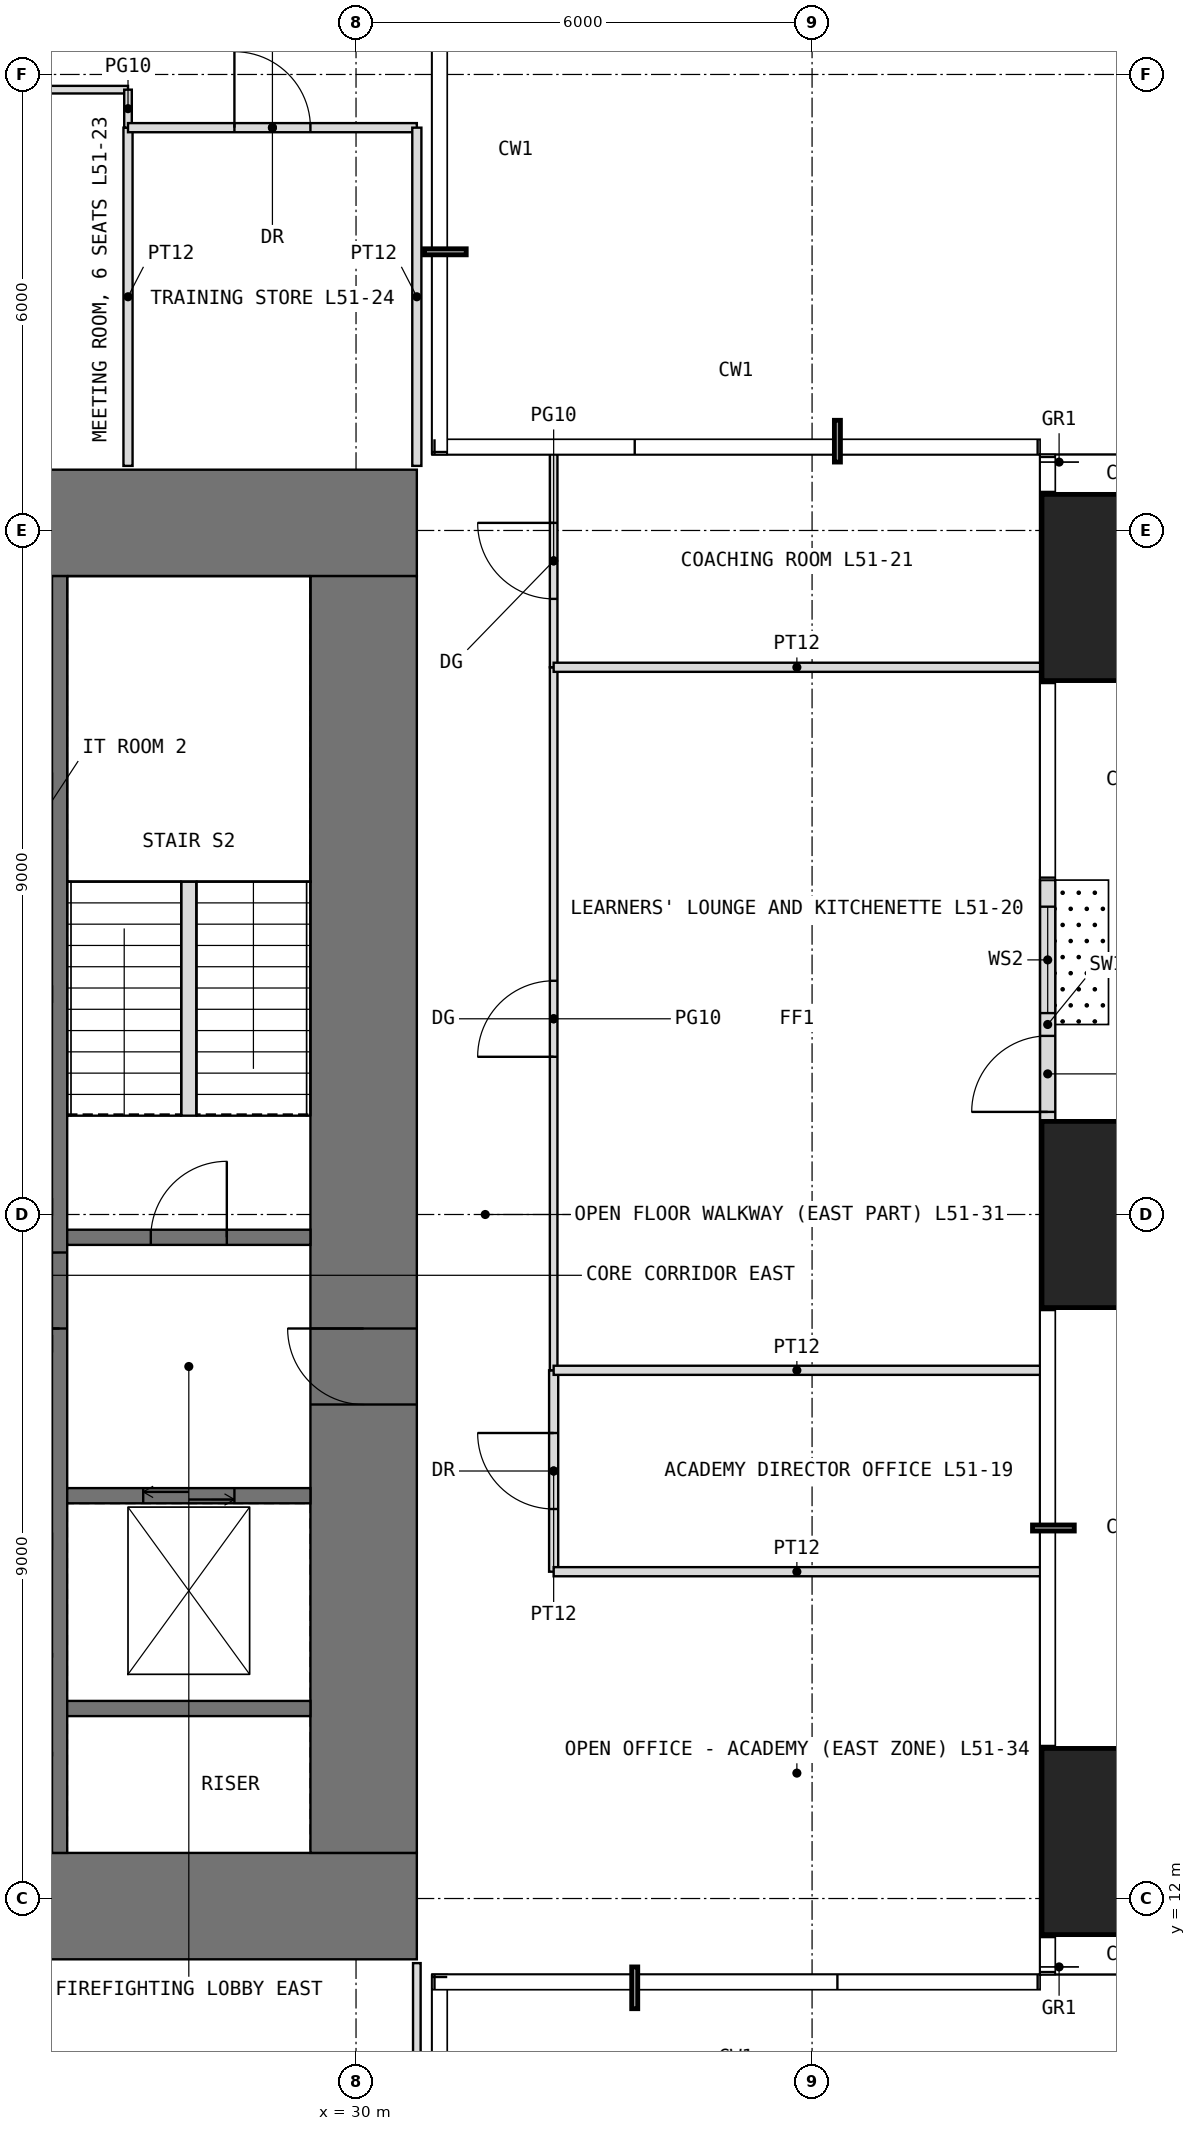
"""IFC4 building model, lengths in metres.
Left out: names, types, materials, properties, quantities, classifications, styles, units other than length and angle.
Written with IfcOpenShell. Run it as: python <this file> out.ifc"""

import sys

from ifc_helpers import new_model, si_unit, direction, frame, frame_2d, origin, origin_2d, place, context, subcontext, project, spatial, rectangle, extrude, element, fill, save


model = new_model("IFC4")
c1 = context("Model", 3, precision=1e-05, world=origin(), true_north=direction((0.0, 1.0)))
c2 = subcontext(c1, "Body", "Model", "MODEL_VIEW")
j1 = project(units=[si_unit("LENGTHUNIT", "METRE"), si_unit("PLANEANGLEUNIT", "RADIAN")], contexts=[c1])
p1 = place(None, origin())
s1 = spatial("IfcSite", under=j1, at=p1, CompositionType="ELEMENT")
p2 = place(p1, origin())
s2 = spatial("IfcBuilding", under=s1, at=p2, CompositionType="ELEMENT")
p3 = place(p2, frame((0.0, 0.0, 214.5)))
s3 = spatial("IfcBuildingStorey", under=s2, at=p3, CompositionType="ELEMENT", Elevation=214.5)
for number, where, z_axis, x_axis in (
    (1, (40.25, 12.75, 0.0), (0.0, 0.0, 1.0), (1.0, 0.0, 0.0)),
    (2, (40.25, 21.0, 0.0), (0.0, 0.0, 1.0), (1.0, 0.0, 0.0)),
    (3, (40.25, 29.25, 0.0), (0.0, 0.0, 1.0), (1.0, 0.0, 0.0)),
):
    element("IfcColumn", number, at=place(p3, frame(where, z_axis=z_axis, x_axis=x_axis)), inside=s3, PredefinedType="COLUMN", context=c2, shape_type="SweptSolid", body=[
        extrude(rectangle(XDim=2.45, YDim=2.45, at=origin_2d()), origin(), (0.0, 0.0, 1.0), 4.0),
    ])
p4 = place(p3, frame((39.1, 21.6, 0.0), z_axis=(0.0, 0.0, 1.0), x_axis=(0.0, 1.0, 0.0)))
e4 = element("IfcWall", 4, at=p4, inside=s3, PredefinedType="USERDEFINED", context=c2, shape_type="SweptSolid", body=[
    extrude(rectangle(XDim=3.8, YDim=0.2, at=frame_2d((1.9, 0.0))), origin(), (0.0, 0.0, 1.0), 3.75),
])
p5 = place(p4, frame((0.75, 0.0, 0.0)))
e5 = element("IfcOpeningElement", 5, at=p5, cuts=e4, PredefinedType="OPENING", context=c2, shape_type="SweptSolid", body=[
    extrude(rectangle(XDim=1.0, YDim=2.4, at=frame_2d((0.5, 1.2))), frame((0.0, 0.11, 0.0), z_axis=(0.0, -1.0, 0.0), x_axis=(1.0, 0.0, 0.0)), (0.0, 0.0, 1.0), 0.22),
])
p6 = place(p4, frame((2.05, 0.0, 0.3)))
e6 = element("IfcOpeningElement", 6, at=p6, cuts=e4, PredefinedType="OPENING", context=c2, shape_type="SweptSolid", body=[
    extrude(rectangle(XDim=1.4, YDim=2.7, at=frame_2d((0.7, 1.35))), frame((0.0, 0.11, 0.0), z_axis=(0.0, -1.0, 0.0), x_axis=(1.0, 0.0, 0.0)), (0.0, 0.0, 1.0), 0.22),
])
p7 = place(p3, frame((11.2, 11.9, -0.05), z_axis=(0.0, 0.0, 1.0), x_axis=(1.0, 0.0, 0.0)))
e7 = element("IfcWall", 7, at=p7, inside=s3, PredefinedType="SHEAR", context=c2, shape_type="SweptSolid", body=[
    extrude(rectangle(XDim=19.6, YDim=1.4, at=frame_2d((9.8, 0.0))), origin(), (0.0, 0.0, 1.0), 4.0),
])
p8 = place(p7, frame((8.8, 0.0, 0.05)))
e8 = element("IfcOpeningElement", 8, at=p8, cuts=e7, PredefinedType="OPENING", context=c2, shape_type="SweptSolid", body=[
    extrude(rectangle(XDim=2.0, YDim=2.2, at=frame_2d((1.0, 1.1))), frame((0.0, 0.71, 0.0), z_axis=(0.0, -1.0, 0.0), x_axis=(1.0, 0.0, 0.0)), (0.0, 0.0, 1.0), 1.42),
])
p9 = place(p3, frame((11.2, 30.1, -0.05), z_axis=(0.0, 0.0, 1.0), x_axis=(1.0, 0.0, 0.0)))
e9 = element("IfcWall", 9, at=p9, inside=s3, PredefinedType="SHEAR", context=c2, shape_type="SweptSolid", body=[
    extrude(rectangle(XDim=19.6, YDim=1.4, at=frame_2d((9.8, 0.0))), origin(), (0.0, 0.0, 1.0), 4.0),
])
p10 = place(p9, frame((8.8, 0.0, 0.05)))
e10 = element("IfcOpeningElement", 10, at=p10, cuts=e9, PredefinedType="OPENING", context=c2, shape_type="SweptSolid", body=[
    extrude(rectangle(XDim=2.0, YDim=2.2, at=frame_2d((1.0, 1.1))), frame((0.0, 0.71, 0.0), z_axis=(0.0, -1.0, 0.0), x_axis=(1.0, 0.0, 0.0)), (0.0, 0.0, 1.0), 1.42),
])
p11 = place(p3, frame((30.1, 12.6, -0.05), z_axis=(0.0, 0.0, 1.0), x_axis=(0.0, 1.0, 0.0)))
e11 = element("IfcWall", 11, at=p11, inside=s3, PredefinedType="SHEAR", context=c2, shape_type="SweptSolid", body=[
    extrude(rectangle(XDim=16.8, YDim=1.4, at=frame_2d((8.4, 0.0))), origin(), (0.0, 0.0, 1.0), 4.0),
])
p12 = place(p11, frame((5.9, 0.0, 0.05)))
e12 = element("IfcOpeningElement", 12, at=p12, cuts=e11, PredefinedType="OPENING", context=c2, shape_type="SweptSolid", body=[
    extrude(rectangle(XDim=1.0, YDim=2.2, at=frame_2d((0.5, 1.1))), frame((0.0, 0.71, 0.0), z_axis=(0.0, -1.0, 0.0), x_axis=(1.0, 0.0, 0.0)), (0.0, 0.0, 1.0), 1.42),
])
p13 = place(p3, frame((26.1, 12.6, -0.05), z_axis=(0.0, 0.0, 1.0), x_axis=(0.0, 1.0, 0.0)))
e13 = element("IfcWall", 13, at=p13, inside=s3, PredefinedType="SHEAR", context=c2, shape_type="SweptSolid", body=[
    extrude(rectangle(XDim=16.8, YDim=0.2, at=frame_2d((8.4, 0.0))), origin(), (0.0, 0.0, 1.0), 4.0),
])
p14 = place(p13, frame((6.9, 0.0, 0.05)))
e14 = element("IfcOpeningElement", 14, at=p14, cuts=e13, PredefinedType="OPENING", context=c2, shape_type="SweptSolid", body=[
    extrude(rectangle(XDim=1.0, YDim=2.2, at=frame_2d((0.5, 1.1))), frame((0.0, 0.11, 0.0), z_axis=(0.0, -1.0, 0.0), x_axis=(1.0, 0.0, 0.0)), (0.0, 0.0, 1.0), 0.22),
])
for number, where, z_axis, x_axis in (
    (15, (22.8, 16.7, -0.05), (0.0, 0.0, 1.0), (1.0, 0.0, 0.0)),
    (16, (22.8, 19.3, -0.05), (0.0, 0.0, 1.0), (1.0, 0.0, 0.0)),
    (17, (22.8, 21.1, -0.05), (0.0, 0.0, 1.0), (1.0, 0.0, 0.0)),
    (18, (22.8, 23.9, -0.05), (0.0, 0.0, 1.0), (1.0, 0.0, 0.0)),
    (19, (22.8, 26.7, -0.05), (0.0, 0.0, 1.0), (1.0, 0.0, 0.0)),
    (20, (26.2, 14.5, -0.05), (0.0, 0.0, 1.0), (1.0, 0.0, 0.0)),
):
    element("IfcWall", number, at=place(p3, frame(where, z_axis=z_axis, x_axis=x_axis)), inside=s3, PredefinedType="SHEAR", context=c2, shape_type="SweptSolid", body=[
        extrude(rectangle(XDim=3.2, YDim=0.2, at=frame_2d((1.6, 0.0))), origin(), (0.0, 0.0, 1.0), 4.0),
    ])
p15 = place(p3, frame((26.2, 17.3, -0.05), z_axis=(0.0, 0.0, 1.0), x_axis=(1.0, 0.0, 0.0)))
e21 = element("IfcWall", 21, at=p15, inside=s3, PredefinedType="SHEAR", context=c2, shape_type="SweptSolid", body=[
    extrude(rectangle(XDim=3.2, YDim=0.2, at=frame_2d((1.6, 0.0))), origin(), (0.0, 0.0, 1.0), 4.0),
])
p16 = place(p15, frame((1.0, 0.0, 0.05)))
e22 = element("IfcOpeningElement", 22, at=p16, cuts=e21, PredefinedType="OPENING", context=c2, shape_type="SweptSolid", body=[
    extrude(rectangle(XDim=1.2, YDim=2.2, at=frame_2d((0.6, 1.1))), frame((0.0, 0.11, 0.0), z_axis=(0.0, -1.0, 0.0), x_axis=(1.0, 0.0, 0.0)), (0.0, 0.0, 1.0), 0.22),
])
p17 = place(p3, frame((26.2, 20.7, -0.05), z_axis=(0.0, 0.0, 1.0), x_axis=(1.0, 0.0, 0.0)))
e23 = element("IfcWall", 23, at=p17, inside=s3, PredefinedType="SHEAR", context=c2, shape_type="SweptSolid", body=[
    extrude(rectangle(XDim=3.2, YDim=0.2, at=frame_2d((1.6, 0.0))), origin(), (0.0, 0.0, 1.0), 4.0),
])
p18 = place(p17, frame((1.1, 0.0, 0.05)))
e24 = element("IfcOpeningElement", 24, at=p18, cuts=e23, PredefinedType="OPENING", context=c2, shape_type="SweptSolid", body=[
    extrude(rectangle(XDim=1.0, YDim=2.2, at=frame_2d((0.5, 1.1))), frame((0.0, 0.11, 0.0), z_axis=(0.0, -1.0, 0.0), x_axis=(1.0, 0.0, 0.0)), (0.0, 0.0, 1.0), 0.22),
])
p19 = place(p3, frame((23.4, 35.8, 0.0), z_axis=(0.0, 0.0, 1.0), x_axis=(1.0, 0.0, 0.0)))
e25 = element("IfcWall", 25, at=p19, inside=s3, PredefinedType="PARTITIONING", context=c2, shape_type="SweptSolid", body=[
    extrude(rectangle(XDim=3.6, YDim=0.1, at=frame_2d((1.8, 0.0))), origin(), (0.0, 0.0, 1.0), 3.75),
])
p20 = place(p19, frame((1.3, 0.0, 0.0)))
e26 = element("IfcOpeningElement", 26, at=p20, cuts=e25, PredefinedType="OPENING", context=c2, shape_type="SweptSolid", body=[
    extrude(rectangle(XDim=1.0, YDim=2.4, at=frame_2d((0.5, 1.2))), frame((0.0, 0.06, 0.0), z_axis=(0.0, -1.0, 0.0), x_axis=(1.0, 0.0, 0.0)), (0.0, 0.0, 1.0), 0.12),
])
p21 = place(p3, frame((27.0, 30.85, 0.0), z_axis=(0.0, 0.0, 1.0), x_axis=(0.0, 1.0, 0.0)))
e27 = element("IfcWall", 27, at=p21, inside=s3, PredefinedType="PARTITIONING", context=c2, shape_type="SweptSolid", body=[
    extrude(rectangle(XDim=4.45, YDim=0.12, at=frame_2d((2.225, 0.0))), origin(), (0.0, 0.0, 1.0), 3.75),
])
p22 = place(p3, frame((27.0, 35.3, 0.0), z_axis=(0.0, 0.0, 1.0), x_axis=(0.0, 1.0, 0.0)))
e28 = element("IfcWall", 28, at=p22, inside=s3, PredefinedType="PARTITIONING", context=c2, shape_type="SweptSolid", body=[
    extrude(rectangle(XDim=0.5, YDim=0.1, at=frame_2d((0.25, 0.0))), origin(), (0.0, 0.0, 1.0), 3.75),
])
p23 = place(p3, frame((27.0, 35.3, 0.0), z_axis=(0.0, 0.0, 1.0), x_axis=(1.0, 0.0, 0.0)))
e29 = element("IfcWall", 29, at=p23, inside=s3, PredefinedType="PARTITIONING", context=c2, shape_type="SweptSolid", body=[
    extrude(rectangle(XDim=3.8, YDim=0.12, at=frame_2d((1.9, 0.0))), origin(), (0.0, 0.0, 1.0), 3.75),
])
p24 = place(p23, frame((1.4, 0.0, 0.0)))
e30 = element("IfcOpeningElement", 30, at=p24, cuts=e29, PredefinedType="OPENING", context=c2, shape_type="SweptSolid", body=[
    extrude(rectangle(XDim=1.0, YDim=2.2, at=frame_2d((0.5, 1.1))), frame((0.0, 0.07, 0.0), z_axis=(0.0, -1.0, 0.0), x_axis=(1.0, 0.0, 0.0)), (0.0, 0.0, 1.0), 0.14),
])
p25 = place(p3, frame((30.8, 5.6, 0.0), z_axis=(0.0, 0.0, 1.0), x_axis=(0.0, 1.0, 0.0)))
e31 = element("IfcWall", 31, at=p25, inside=s3, PredefinedType="PARTITIONING", context=c2, shape_type="SweptSolid", body=[
    extrude(rectangle(XDim=5.55, YDim=0.1, at=frame_2d((2.775, 0.0))), origin(), (0.0, 0.0, 1.0), 3.75),
])
p26 = place(p3, frame((30.8, 30.85, 0.0), z_axis=(0.0, 0.0, 1.0), x_axis=(0.0, 1.0, 0.0)))
e32 = element("IfcWall", 32, at=p26, inside=s3, PredefinedType="PARTITIONING", context=c2, shape_type="SweptSolid", body=[
    extrude(rectangle(XDim=4.45, YDim=0.12, at=frame_2d((2.225, 0.0))), origin(), (0.0, 0.0, 1.0), 3.75),
])
p27 = place(p3, frame((32.6, 16.3, 0.0), z_axis=(0.0, 0.0, 1.0), x_axis=(0.0, 1.0, 0.0)))
e33 = element("IfcWall", 33, at=p27, inside=s3, PredefinedType="PARTITIONING", context=c2, shape_type="SweptSolid", body=[
    extrude(rectangle(XDim=2.65, YDim=0.12, at=frame_2d((1.325, 0.0))), origin(), (0.0, 0.0, 1.0), 3.75),
])
p28 = place(p27, frame((0.825, 0.0, 0.0)))
e34 = element("IfcOpeningElement", 34, at=p28, cuts=e33, PredefinedType="OPENING", context=c2, shape_type="SweptSolid", body=[
    extrude(rectangle(XDim=1.0, YDim=2.2, at=frame_2d((0.5, 1.1))), frame((0.0, 0.07, 0.0), z_axis=(0.0, -1.0, 0.0), x_axis=(1.0, 0.0, 0.0)), (0.0, 0.0, 1.0), 0.14),
])
p29 = place(p3, frame((32.6, 16.3, 0.0), z_axis=(0.0, 0.0, 1.0), x_axis=(1.0, 0.0, 0.0)))
e35 = element("IfcWall", 35, at=p29, inside=s3, PredefinedType="PARTITIONING", context=c2, shape_type="SweptSolid", body=[
    extrude(rectangle(XDim=6.4, YDim=0.12, at=frame_2d((3.2, 0.0))), origin(), (0.0, 0.0, 1.0), 3.75),
])
p30 = place(p3, frame((32.6, 18.95, 0.0), z_axis=(0.0, 0.0, 1.0), x_axis=(0.0, 1.0, 0.0)))
e36 = element("IfcWall", 36, at=p30, inside=s3, PredefinedType="PARTITIONING", context=c2, shape_type="SweptSolid", body=[
    extrude(rectangle(XDim=9.25, YDim=0.1, at=frame_2d((4.625, 0.0))), origin(), (0.0, 0.0, 1.0), 3.75),
])
p31 = place(p30, frame((4.125, 0.0, 0.0)))
e37 = element("IfcOpeningElement", 37, at=p31, cuts=e36, PredefinedType="OPENING", context=c2, shape_type="SweptSolid", body=[
    extrude(rectangle(XDim=1.0, YDim=2.4, at=frame_2d((0.5, 1.2))), frame((0.0, 0.06, 0.0), z_axis=(0.0, -1.0, 0.0), x_axis=(1.0, 0.0, 0.0)), (0.0, 0.0, 1.0), 0.12),
])
p32 = place(p3, frame((32.6, 18.95, 0.0), z_axis=(0.0, 0.0, 1.0), x_axis=(1.0, 0.0, 0.0)))
e38 = element("IfcWall", 38, at=p32, inside=s3, PredefinedType="PARTITIONING", context=c2, shape_type="SweptSolid", body=[
    extrude(rectangle(XDim=6.4, YDim=0.12, at=frame_2d((3.2, 0.0))), origin(), (0.0, 0.0, 1.0), 3.75),
])
p33 = place(p3, frame((32.6, 28.2, 0.0), z_axis=(0.0, 0.0, 1.0), x_axis=(0.0, 1.0, 0.0)))
e39 = element("IfcWall", 39, at=p33, inside=s3, PredefinedType="PARTITIONING", context=c2, shape_type="SweptSolid", body=[
    extrude(rectangle(XDim=2.8, YDim=0.1, at=frame_2d((1.4, 0.0))), origin(), (0.0, 0.0, 1.0), 3.75),
])
p34 = place(p33, frame((0.9, 0.0, 0.0)))
e40 = element("IfcOpeningElement", 40, at=p34, cuts=e39, PredefinedType="OPENING", context=c2, shape_type="SweptSolid", body=[
    extrude(rectangle(XDim=1.0, YDim=2.4, at=frame_2d((0.5, 1.2))), frame((0.0, 0.06, 0.0), z_axis=(0.0, -1.0, 0.0), x_axis=(1.0, 0.0, 0.0)), (0.0, 0.0, 1.0), 0.12),
])
p35 = place(p3, frame((32.6, 28.2, 0.0), z_axis=(0.0, 0.0, 1.0), x_axis=(1.0, 0.0, 0.0)))
e41 = element("IfcWall", 41, at=p35, inside=s3, PredefinedType="PARTITIONING", context=c2, shape_type="SweptSolid", body=[
    extrude(rectangle(XDim=6.4, YDim=0.12, at=frame_2d((3.2, 0.0))), origin(), (0.0, 0.0, 1.0), 3.75),
])
p36 = place(p3, frame((27.8, 22.3, 0.0), z_axis=(0.0, 0.0, 1.0), x_axis=(0.0, 1.0, 0.0)))
e42 = element("IfcWall", 42, at=p36, inside=s3, PredefinedType="PARTITIONING", context=c2, shape_type="SweptSolid", body=[
    extrude(rectangle(XDim=3.08, YDim=0.2, at=frame_2d((1.54, 0.0))), origin(), (0.0, 0.0, 1.0), 4.0),
])
p37 = place(p5, origin())
e43 = element("IfcDoor", 43, at=p37, inside=s3, OperationType="SINGLE_SWING_LEFT", PredefinedType="DOOR", context=c2, shape_type="SweptSolid", body=[
    extrude(rectangle(XDim=1.0, YDim=2.4, at=frame_2d((0.5, 1.2))), frame((0.0, 0.025, 0.0), z_axis=(0.0, -1.0, 0.0), x_axis=(1.0, 0.0, 0.0)), (0.0, 0.0, 1.0), 0.05),
])
fill(e5, e43)
p38 = place(p6, origin())
e44 = element("IfcWindow", 44, at=p38, inside=s3, PartitioningType="SINGLE_PANEL", PredefinedType="WINDOW", context=c2, shape_type="SweptSolid", body=[
    extrude(rectangle(XDim=1.4, YDim=2.7, at=frame_2d((0.7, 1.35))), frame((0.0, 0.03, 0.0), z_axis=(0.0, -1.0, 0.0), x_axis=(1.0, 0.0, 0.0)), (0.0, 0.0, 1.0), 0.06),
])
fill(e6, e44)
p39 = place(p12, origin())
e45 = element("IfcDoor", 45, at=p39, inside=s3, OperationType="SINGLE_SWING_RIGHT", PredefinedType="DOOR", context=c2, shape_type="SweptSolid", body=[
    extrude(rectangle(XDim=1.0, YDim=2.2, at=frame_2d((0.5, 1.1))), frame((0.0, 0.025, 0.0), z_axis=(0.0, -1.0, 0.0), x_axis=(1.0, 0.0, 0.0)), (0.0, 0.0, 1.0), 0.05),
])
fill(e12, e45)
p40 = place(p18, origin())
e46 = element("IfcDoor", 46, at=p40, inside=s3, OperationType="SINGLE_SWING_RIGHT", PredefinedType="DOOR", context=c2, shape_type="SweptSolid", body=[
    extrude(rectangle(XDim=1.0, YDim=2.2, at=frame_2d((0.5, 1.1))), frame((0.0, 0.025, 0.0), z_axis=(0.0, -1.0, 0.0), x_axis=(1.0, 0.0, 0.0)), (0.0, 0.0, 1.0), 0.05),
])
fill(e24, e46)
p41 = place(p14, origin())
e47 = element("IfcDoor", 47, at=p41, inside=s3, OperationType="SINGLE_SWING_LEFT", PredefinedType="DOOR", context=c2, shape_type="SweptSolid", body=[
    extrude(rectangle(XDim=1.0, YDim=2.2, at=frame_2d((0.5, 1.1))), frame((0.0, 0.025, 0.0), z_axis=(0.0, -1.0, 0.0), x_axis=(1.0, 0.0, 0.0)), (0.0, 0.0, 1.0), 0.05),
])
fill(e14, e47)
p42 = place(p28, origin())
e48 = element("IfcDoor", 48, at=p42, inside=s3, OperationType="SINGLE_SWING_RIGHT", PredefinedType="DOOR", context=c2, shape_type="SweptSolid", body=[
    extrude(rectangle(XDim=1.0, YDim=2.2, at=frame_2d((0.5, 1.1))), frame((0.0, 0.025, 0.0), z_axis=(0.0, -1.0, 0.0), x_axis=(1.0, 0.0, 0.0)), (0.0, 0.0, 1.0), 0.05),
])
fill(e34, e48)
p43 = place(p31, origin())
e49 = element("IfcDoor", 49, at=p43, inside=s3, OperationType="SINGLE_SWING_LEFT", PredefinedType="DOOR", context=c2, shape_type="SweptSolid", body=[
    extrude(rectangle(XDim=1.0, YDim=2.4, at=frame_2d((0.5, 1.2))), frame((0.0, 0.025, 0.0), z_axis=(0.0, -1.0, 0.0), x_axis=(1.0, 0.0, 0.0)), (0.0, 0.0, 1.0), 0.05),
])
fill(e37, e49)
p44 = place(p34, origin())
e50 = element("IfcDoor", 50, at=p44, inside=s3, OperationType="SINGLE_SWING_RIGHT", PredefinedType="DOOR", context=c2, shape_type="SweptSolid", body=[
    extrude(rectangle(XDim=1.0, YDim=2.4, at=frame_2d((0.5, 1.2))), frame((0.0, 0.025, 0.0), z_axis=(0.0, -1.0, 0.0), x_axis=(1.0, 0.0, 0.0)), (0.0, 0.0, 1.0), 0.05),
])
fill(e40, e50)
p45 = place(p24, origin())
e51 = element("IfcDoor", 51, at=p45, inside=s3, OperationType="SINGLE_SWING_LEFT", PredefinedType="DOOR", context=c2, shape_type="SweptSolid", body=[
    extrude(rectangle(XDim=1.0, YDim=2.2, at=frame_2d((0.5, 1.1))), frame((0.0, 0.025, 0.0), z_axis=(0.0, -1.0, 0.0), x_axis=(1.0, 0.0, 0.0)), (0.0, 0.0, 1.0), 0.05),
])
fill(e30, e51)
p46 = place(p16, origin())
e52 = element("IfcDoor", 52, at=p46, inside=s3, OperationType="DOUBLE_DOOR_SLIDING", PredefinedType="DOOR", context=c2, shape_type="SweptSolid", body=[
    extrude(rectangle(XDim=1.2, YDim=2.2, at=frame_2d((0.6, 1.1))), frame((0.0, 0.025, 0.0), z_axis=(0.0, -1.0, 0.0), x_axis=(1.0, 0.0, 0.0)), (0.0, 0.0, 1.0), 0.05),
])
fill(e22, e52)
save(model, sys.argv[1])
